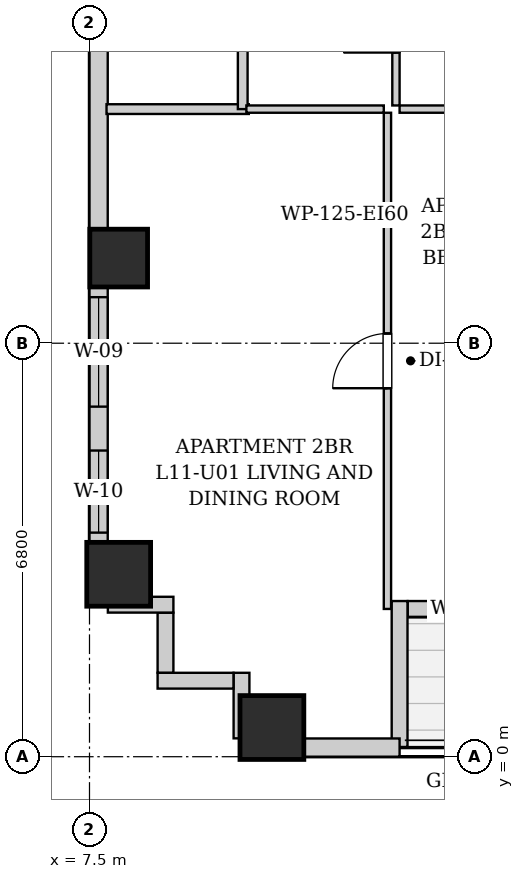
"""IFC4 building model, lengths in metres.
Left out: names, types, materials, properties, quantities, classifications, styles, units other than length and angle.
Written with IfcOpenShell. Run it as: python <this file> out.ifc"""

import sys

from ifc_helpers import new_model, si_unit, direction, frame, frame_2d, origin, origin_2d, place, context, subcontext, project, spatial, rectangle, extrude, element, fill, save


model = new_model("IFC4")
c1 = context("Model", 3, precision=1e-05, world=origin(), true_north=direction((0.0, 1.0)))
c2 = subcontext(c1, "Body", "Model", "MODEL_VIEW")
j1 = project(units=[si_unit("LENGTHUNIT", "METRE"), si_unit("PLANEANGLEUNIT", "RADIAN")], contexts=[c1])
p1 = place(None, origin())
s1 = spatial("IfcSite", under=j1, at=p1, CompositionType="ELEMENT")
p2 = place(p1, origin())
s2 = spatial("IfcBuilding", under=s1, at=p2, CompositionType="ELEMENT")
p3 = place(p2, frame((0.0, 0.0, 45.0)))
s3 = spatial("IfcBuildingStorey", under=s2, at=p3, CompositionType="ELEMENT", Elevation=45.0)
for number, where, z_axis, x_axis in (
    (1, (10.5, 0.48, 0.0), (0.0, 0.0, 1.0), (1.0, 0.0, 0.0)),
    (2, (7.98, 3.0, 0.0), (0.0, 0.0, 1.0), (1.0, 0.0, 0.0)),
):
    element("IfcColumn", number, at=place(p3, frame(where, z_axis=z_axis, x_axis=x_axis)), inside=s3, PredefinedType="COLUMN", context=c2, shape_type="SweptSolid", body=[
        extrude(rectangle(XDim=1.05, YDim=1.05, at=origin_2d()), origin(), (0.0, 0.0, 1.0), 3.2),
    ])
p4 = place(p3, frame((7.98, 8.2, 0.0), z_axis=(0.0, 0.0, 1.0), x_axis=(1.0, 0.0, 0.0)))
e3 = element("IfcColumn", 3, at=p4, inside=s3, PredefinedType="COLUMN", context=c2, shape_type="SweptSolid", body=[
    extrude(rectangle(XDim=0.95, YDim=0.95, at=origin_2d()), origin(), (0.0, 0.0, 1.0), 3.2),
])
p5 = place(p3, frame((18.166, 2.43, 0.0), z_axis=(0.0, 0.0, 1.0), x_axis=(-1.0, 0.0, 0.0)))
e4 = element("IfcWall", 4, at=p5, inside=s3, PredefinedType="SOLIDWALL", context=c2, shape_type="SweptSolid", body=[
    extrude(rectangle(XDim=5.432, YDim=0.26, at=frame_2d((2.716, 0.0))), origin(), (0.0, 0.0, 1.0), 2.94),
])
p6 = place(p5, frame((2.591, 0.0, 0.0)))
e5 = element("IfcOpeningElement", 5, at=p6, cuts=e4, PredefinedType="OPENING", context=c2, shape_type="SweptSolid", body=[
    extrude(rectangle(XDim=1.1, YDim=2.0, at=frame_2d((0.55, 1.0))), frame((0.0, 0.14, 0.0), z_axis=(0.0, -1.0, 0.0), x_axis=(1.0, 0.0, 0.0)), (0.0, 0.0, 1.0), 0.28),
])
p7 = place(p5, frame((3.851, 0.0, 0.55)))
e6 = element("IfcOpeningElement", 6, at=p7, cuts=e4, PredefinedType="OPENING", context=c2, shape_type="SweptSolid", body=[
    extrude(rectangle(XDim=0.85, YDim=1.2, at=frame_2d((0.425, 0.6))), frame((0.0, 0.14, 0.0), z_axis=(0.0, -1.0, 0.0), x_axis=(1.0, 0.0, 0.0)), (0.0, 0.0, 1.0), 0.28),
])
p8 = place(p5, frame((0.683, 0.0, 0.85)))
e7 = element("IfcOpeningElement", 7, at=p8, cuts=e4, PredefinedType="OPENING", context=c2, shape_type="SweptSolid", body=[
    extrude(rectangle(XDim=1.35, YDim=1.65, at=frame_2d((0.675, 0.825))), frame((0.0, 0.14, 0.0), z_axis=(0.0, -1.0, 0.0), x_axis=(1.0, 0.0, 0.0)), (0.0, 0.0, 1.0), 0.28),
])
p9 = place(p3, frame((12.6, 2.56, 0.0), z_axis=(0.0, 0.0, 1.0), x_axis=(0.0, -1.0, 0.0)))
e8 = element("IfcWall", 8, at=p9, inside=s3, PredefinedType="SOLIDWALL", context=c2, shape_type="SweptSolid", body=[
    extrude(rectangle(XDim=2.4, YDim=0.26, at=frame_2d((1.2, 0.0))), origin(), (0.0, 0.0, 1.0), 2.94),
])
p10 = place(p3, frame((12.6, 0.15, 0.0), z_axis=(0.0, 0.0, 1.0), x_axis=(-1.0, 0.0, 0.0)))
e9 = element("IfcWall", 9, at=p10, inside=s3, PredefinedType="SOLIDWALL", context=c2, shape_type="SweptSolid", body=[
    extrude(rectangle(XDim=2.6, YDim=0.3, at=frame_2d((1.3, 0.0))), origin(), (0.0, 0.0, 1.0), 1.975),
])
p11 = place(p3, frame((7.65, 2.5, 0.0), z_axis=(0.0, 0.0, 1.0), x_axis=(0.0, 1.0, 0.0)))
e10 = element("IfcWall", 10, at=p11, inside=s3, PredefinedType="SOLIDWALL", context=c2, shape_type="SweptSolid", body=[
    extrude(rectangle(XDim=12.7, YDim=0.3, at=frame_2d((6.35, 0.0))), origin(), (0.0, 0.0, 1.0), 1.975),
])
p12 = place(p11, frame((3.257, 0.0, 0.55)))
e11 = element("IfcOpeningElement", 11, at=p12, cuts=e10, PredefinedType="OPENING", context=c2, shape_type="SweptSolid", body=[
    extrude(rectangle(XDim=1.8, YDim=1.2, at=frame_2d((0.9, 0.6))), frame((0.0, 0.16, 0.0), z_axis=(0.0, -1.0, 0.0), x_axis=(1.0, 0.0, 0.0)), (0.0, 0.0, 1.0), 0.32),
])
p13 = place(p11, frame((1.185, 0.0, 0.55)))
e12 = element("IfcOpeningElement", 12, at=p13, cuts=e10, PredefinedType="OPENING", context=c2, shape_type="SweptSolid", body=[
    extrude(rectangle(XDim=1.35, YDim=1.2, at=frame_2d((0.675, 0.6))), frame((0.0, 0.16, 0.0), z_axis=(0.0, -1.0, 0.0), x_axis=(1.0, 0.0, 0.0)), (0.0, 0.0, 1.0), 0.32),
])
p14 = place(p3, frame((10.0, 0.302, 0.0), z_axis=(0.0, 0.0, 1.0), x_axis=(0.0, 1.0, 0.0)))
e13 = element("IfcWall", 13, at=p14, inside=s3, PredefinedType="SOLIDWALL", context=c2, shape_type="SweptSolid", body=[
    extrude(rectangle(XDim=1.078, YDim=0.26, at=frame_2d((0.539, 0.0))), origin(), (0.0, 0.0, 1.0), 2.94),
])
p15 = place(p3, frame((9.868, 1.25, 0.0), z_axis=(0.0, 0.0, 1.0), x_axis=(-1.0, 0.0, 0.0)))
e14 = element("IfcWall", 14, at=p15, inside=s3, PredefinedType="SOLIDWALL", context=c2, shape_type="SweptSolid", body=[
    extrude(rectangle(XDim=1.248, YDim=0.26, at=frame_2d((0.624, 0.0))), origin(), (0.0, 0.0, 1.0), 2.94),
])
p16 = place(p3, frame((8.75, 1.382, 0.0), z_axis=(0.0, 0.0, 1.0), x_axis=(0.0, 1.0, 0.0)))
e15 = element("IfcWall", 15, at=p16, inside=s3, PredefinedType="SOLIDWALL", context=c2, shape_type="SweptSolid", body=[
    extrude(rectangle(XDim=0.986, YDim=0.26, at=frame_2d((0.493, 0.0))), origin(), (0.0, 0.0, 1.0), 2.94),
])
p17 = place(p3, frame((8.88, 2.5, 0.0), z_axis=(0.0, 0.0, 1.0), x_axis=(-1.0, 0.0, 0.0)))
e16 = element("IfcWall", 16, at=p17, inside=s3, PredefinedType="SOLIDWALL", context=c2, shape_type="SweptSolid", body=[
    extrude(rectangle(XDim=1.078, YDim=0.26, at=frame_2d((0.539, 0.0))), origin(), (0.0, 0.0, 1.0), 2.94),
])
p18 = place(p3, frame((7.78, 10.65, 0.0), z_axis=(0.0, 0.0, 1.0), x_axis=(1.0, 0.0, 0.0)))
e17 = element("IfcWall", 17, at=p18, inside=s3, PredefinedType="PARTITIONING", context=c2, shape_type="SweptSolid", body=[
    extrude(rectangle(XDim=2.34, YDim=0.16, at=frame_2d((1.17, 0.0))), origin(), (0.0, 0.0, 1.0), 2.94),
])
p19 = place(p3, frame((10.02, 10.65, 0.0), z_axis=(0.0, 0.0, 1.0), x_axis=(0.0, 1.0, 0.0)))
e18 = element("IfcWall", 18, at=p19, inside=s3, PredefinedType="PARTITIONING", context=c2, shape_type="SweptSolid", body=[
    extrude(rectangle(XDim=2.66, YDim=0.16, at=frame_2d((1.33, 0.0))), origin(), (0.0, 0.0, 1.0), 2.94),
])
p20 = place(p3, frame((12.54, 10.71, 0.0), z_axis=(0.0, 0.0, 1.0), x_axis=(0.0, 1.0, 0.0)))
e19 = element("IfcWall", 19, at=p20, inside=s3, PredefinedType="PARTITIONING", context=c2, shape_type="SweptSolid", body=[
    extrude(rectangle(XDim=2.6, YDim=0.12, at=frame_2d((1.3, 0.0))), origin(), (0.0, 0.0, 1.0), 2.94),
])
p21 = place(p20, frame((0.87, 0.0, 0.0)))
e20 = element("IfcOpeningElement", 20, at=p21, cuts=e19, PredefinedType="OPENING", context=c2, shape_type="SweptSolid", body=[
    extrude(rectangle(XDim=0.86, YDim=2.05, at=frame_2d((0.43, 1.025))), frame((0.0, 0.07, 0.0), z_axis=(0.0, -1.0, 0.0), x_axis=(1.0, 0.0, 0.0)), (0.0, 0.0, 1.0), 0.14),
])
p22 = place(p3, frame((10.08, 10.65, 0.0), z_axis=(0.0, 0.0, 1.0), x_axis=(1.0, 0.0, 0.0)))
e21 = element("IfcWall", 21, at=p22, inside=s3, PredefinedType="PARTITIONING", context=c2, shape_type="SweptSolid", body=[
    extrude(rectangle(XDim=2.26, YDim=0.12, at=frame_2d((1.13, 0.0))), origin(), (0.0, 0.0, 1.0), 2.94),
])
p23 = place(p3, frame((12.6, 10.65, 0.0), z_axis=(0.0, 0.0, 1.0), x_axis=(1.0, 0.0, 0.0)))
e22 = element("IfcWall", 22, at=p23, inside=s3, PredefinedType="PARTITIONING", context=c2, shape_type="SweptSolid", body=[
    extrude(rectangle(XDim=3.055, YDim=0.12, at=frame_2d((1.527, 0.0))), origin(), (0.0, 0.0, 1.0), 2.94),
])
p24 = place(p23, frame((1.077, 0.0, 0.0)))
e23 = element("IfcOpeningElement", 23, at=p24, cuts=e22, PredefinedType="OPENING", context=c2, shape_type="SweptSolid", body=[
    extrude(rectangle(XDim=0.9, YDim=2.05, at=frame_2d((0.45, 1.025))), frame((0.0, 0.07, 0.0), z_axis=(0.0, -1.0, 0.0), x_axis=(1.0, 0.0, 0.0)), (0.0, 0.0, 1.0), 0.14),
])
p25 = place(p3, frame((12.4, 2.43, 0.0), z_axis=(0.0, 0.0, 1.0), x_axis=(0.0, 1.0, 0.0)))
e24 = element("IfcWall", 24, at=p25, inside=s3, PredefinedType="PARTITIONING", context=c2, shape_type="SweptSolid", body=[
    extrude(rectangle(XDim=8.16, YDim=0.12, at=frame_2d((4.08, 0.0))), origin(), (0.0, 0.0, 1.0), 2.94),
])
p26 = place(p25, frame((3.63, 0.0, 0.0)))
e25 = element("IfcOpeningElement", 25, at=p26, cuts=e24, PredefinedType="OPENING", context=c2, shape_type="SweptSolid", body=[
    extrude(rectangle(XDim=0.9, YDim=2.05, at=frame_2d((0.45, 1.025))), frame((0.0, 0.07, 0.0), z_axis=(0.0, -1.0, 0.0), x_axis=(1.0, 0.0, 0.0)), (0.0, 0.0, 1.0), 0.14),
])
p27 = place(p21, origin())
e26 = element("IfcDoor", 26, at=p27, inside=s3, OperationType="SINGLE_SWING_LEFT", PredefinedType="DOOR", context=c2, shape_type="SweptSolid", body=[
    extrude(rectangle(XDim=0.86, YDim=2.05, at=frame_2d((0.43, 1.025))), frame((0.0, 0.025, 0.0), z_axis=(0.0, -1.0, 0.0), x_axis=(1.0, 0.0, 0.0)), (0.0, 0.0, 1.0), 0.05),
])
fill(e20, e26)
p28 = place(p26, origin())
e27 = element("IfcDoor", 27, at=p28, inside=s3, OperationType="SINGLE_SWING_LEFT", PredefinedType="DOOR", context=c2, shape_type="SweptSolid", body=[
    extrude(rectangle(XDim=0.9, YDim=2.05, at=frame_2d((0.45, 1.025))), frame((0.0, 0.025, 0.0), z_axis=(0.0, -1.0, 0.0), x_axis=(1.0, 0.0, 0.0)), (0.0, 0.0, 1.0), 0.05),
])
fill(e25, e27)
p29 = place(p12, origin())
e28 = element("IfcWindow", 28, at=p29, inside=s3, PartitioningType="DOUBLE_PANEL_VERTICAL", PredefinedType="WINDOW", context=c2, shape_type="SweptSolid", body=[
    extrude(rectangle(XDim=1.8, YDim=1.2, at=frame_2d((0.9, 0.6))), frame((0.0, 0.03, 0.0), z_axis=(0.0, -1.0, 0.0), x_axis=(1.0, 0.0, 0.0)), (0.0, 0.0, 1.0), 0.06),
])
fill(e11, e28)
p30 = place(p13, origin())
e29 = element("IfcWindow", 29, at=p30, inside=s3, PartitioningType="SINGLE_PANEL", PredefinedType="WINDOW", context=c2, shape_type="SweptSolid", body=[
    extrude(rectangle(XDim=1.35, YDim=1.2, at=frame_2d((0.675, 0.6))), frame((0.0, 0.03, 0.0), z_axis=(0.0, -1.0, 0.0), x_axis=(1.0, 0.0, 0.0)), (0.0, 0.0, 1.0), 0.06),
])
fill(e12, e29)
save(model, sys.argv[1])
